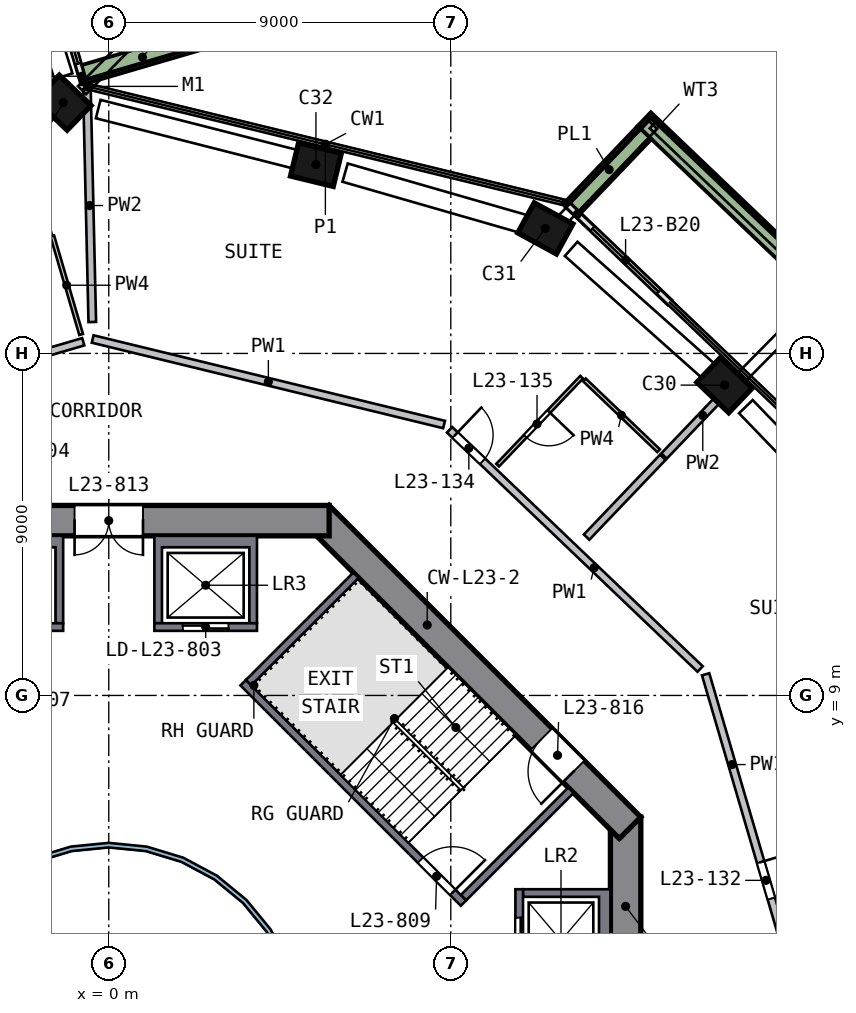
"""IFC4 building model, lengths in metres.
Left out: names, types, materials, properties, quantities, classifications, styles, units other than length and angle.
Written with IfcOpenShell. Run it as: python <this file> out.ifc"""

import sys

from ifc_helpers import new_model, si_unit, direction, frame, frame_2d, origin, origin_2d, place, context, subcontext, project, spatial, polyline, rectangle, outline, extrude, element, fill, save


model = new_model("IFC4")
c1 = context("Model", 3, precision=1e-05, world=origin(), true_north=direction((0.0, 1.0)))
c2 = subcontext(c1, "Body", "Model", "MODEL_VIEW")
j1 = project(units=[si_unit("LENGTHUNIT", "METRE"), si_unit("PLANEANGLEUNIT", "RADIAN")], contexts=[c1])
p1 = place(None, origin())
s1 = spatial("IfcSite", under=j1, at=p1, CompositionType="ELEMENT")
p2 = place(p1, origin())
s2 = spatial("IfcBuilding", under=s1, at=p2, CompositionType="ELEMENT")
p3 = place(p2, frame((0.0, 0.0, 100.0)))
s3 = spatial("IfcBuildingStorey", under=s2, at=p3, CompositionType="ELEMENT", Elevation=100.0)
p4 = place(p3, frame((16.305, 17.074, 0.0), z_axis=(-0.0819059, 0.076886597, 0.993669902), x_axis=(-0.718682033, 0.686204712, -0.112335337)))
e1 = element("IfcColumn", 1, at=p4, inside=s3, PredefinedType="COLUMN", context=c2, shape_type="SweptSolid", body=[
    extrude(rectangle(XDim=1.15, YDim=0.9, at=origin_2d()), origin(), (0.0, 0.0, 1.0), 3.21),
])
p5 = place(p3, frame((11.611, 21.225, 0.0), z_axis=(-0.101418877, 0.054358694, 0.993357611), x_axis=(0.871512169, -0.47668315, 0.115063959)))
e2 = element("IfcColumn", 2, at=p5, inside=s3, PredefinedType="COLUMN", context=c2, shape_type="SweptSolid", body=[
    extrude(rectangle(XDim=1.15, YDim=0.9, at=origin_2d()), origin(), (0.0, 0.0, 1.0), 3.211),
])
p6 = place(p3, frame((5.583, 22.939, 0.0), z_axis=(-0.109285026, 0.025629126, 0.993679994), x_axis=(-0.965473156, 0.235079586, -0.112246039)))
e3 = element("IfcColumn", 3, at=p6, inside=s3, PredefinedType="COLUMN", context=c2, shape_type="SweptSolid", body=[
    extrude(rectangle(XDim=1.15, YDim=0.9, at=origin_2d()), origin(), (0.0, 0.0, 1.0), 3.21),
])
p7 = place(p3, frame((-1.057, 24.606, 0.0), z_axis=(-0.11697585, -0.006004608, 0.993116607), x_axis=(0.716106092, -0.693373762, 0.080155422)))
e4 = element("IfcColumn", 4, at=p7, inside=s3, PredefinedType="COLUMN", context=c2, shape_type="SweptSolid", body=[
    extrude(rectangle(XDim=1.15, YDim=0.9, at=origin_2d()), origin(), (0.0, 0.0, 1.0), 3.212),
])
p8 = place(p3, frame((13.6, -5.799, 0.0), z_axis=(0.0, 0.0, 1.0), x_axis=(0.0, 1.0, 0.0)))
e5 = element("IfcWall", 5, at=p8, inside=s3, PredefinedType="SHEAR", context=c2, shape_type="SweptSolid", body=[
    extrude(rectangle(XDim=11.598, YDim=0.8, at=frame_2d((5.799, 0.0))), origin(), (0.0, 0.0, 1.0), 3.5),
])
p9 = place(p8, frame((4.899, 0.0, 0.0)))
e6 = element("IfcOpeningElement", 6, at=p9, cuts=e5, PredefinedType="OPENING", context=c2, shape_type="SweptSolid", body=[
    extrude(rectangle(XDim=1.8, YDim=2.1, at=frame_2d((0.9, 1.05))), frame((0.0, 0.41, 0.0), z_axis=(0.0, -1.0, 0.0), x_axis=(1.0, 0.0, 0.0)), (0.0, 0.0, 1.0), 0.82),
])
p10 = place(p3, frame((13.717, 5.516, 0.0), z_axis=(0.0, 0.0, 1.0), x_axis=(-0.707106781, 0.707106781, 0.0)))
e7 = element("IfcWall", 7, at=p10, inside=s3, PredefinedType="SHEAR", context=c2, shape_type="SweptSolid", body=[
    extrude(rectangle(XDim=11.598, YDim=0.8, at=frame_2d((5.799, 0.0))), origin(), (0.0, 0.0, 1.0), 3.5),
])
p11 = place(p10, frame((2.099, 0.0, 0.0)))
e8 = element("IfcOpeningElement", 8, at=p11, cuts=e7, PredefinedType="OPENING", context=c2, shape_type="SweptSolid", body=[
    extrude(rectangle(XDim=1.2, YDim=2.1, at=frame_2d((0.6, 1.05))), frame((0.0, 0.41, 0.0), z_axis=(0.0, -1.0, 0.0), x_axis=(1.0, 0.0, 0.0)), (0.0, 0.0, 1.0), 0.82),
])
p12 = place(p3, frame((5.799, 13.6, 0.0), z_axis=(0.0, 0.0, 1.0), x_axis=(-1.0, 0.0, 0.0)))
e9 = element("IfcWall", 9, at=p12, inside=s3, PredefinedType="SHEAR", context=c2, shape_type="SweptSolid", body=[
    extrude(rectangle(XDim=11.598, YDim=0.8, at=frame_2d((5.799, 0.0))), origin(), (0.0, 0.0, 1.0), 3.5),
])
p13 = place(p12, frame((4.899, 0.0, 0.0)))
e10 = element("IfcOpeningElement", 10, at=p13, cuts=e9, PredefinedType="OPENING", context=c2, shape_type="SweptSolid", body=[
    extrude(rectangle(XDim=1.8, YDim=2.1, at=frame_2d((0.9, 1.05))), frame((0.0, 0.41, 0.0), z_axis=(0.0, -1.0, 0.0), x_axis=(1.0, 0.0, 0.0)), (0.0, 0.0, 1.0), 0.82),
])
p14 = place(p3, frame((-0.67, 25.154, 0.0), z_axis=(0.0, 0.0, 1.0), x_axis=(-0.281006451, 0.959705879, 0.0)))
e11 = element("IfcWall", 11, at=p14, inside=s3, PredefinedType="SOLIDWALL", context=c2, shape_type="SweptSolid", body=[
    extrude(rectangle(XDim=2.394, YDim=0.15, at=frame_2d((1.197, 0.0))), origin(), (0.0, 0.0, 1.0), 2.425),
])
p15 = place(p14, frame((0.494, 0.0, 0.0)))
e12 = element("IfcOpeningElement", 12, at=p15, cuts=e11, PredefinedType="OPENING", context=c2, shape_type="SweptSolid", body=[
    extrude(rectangle(XDim=1.5, YDim=2.4, at=frame_2d((0.75, 1.2))), frame((0.0, 0.085, 0.0), z_axis=(0.0, -1.0, 0.0), x_axis=(1.0, 0.0, 0.0)), (0.0, 0.0, 1.0), 0.17),
])
p16 = place(p3, frame((14.757, 19.347, 0.0), z_axis=(0.0, 0.0, 1.0), x_axis=(-0.723237516, 0.690599375, 0.0)))
e13 = element("IfcWall", 13, at=p16, inside=s3, PredefinedType="SOLIDWALL", context=c2, shape_type="SweptSolid", body=[
    extrude(rectangle(XDim=3.71, YDim=0.15, at=frame_2d((1.855, 0.0))), origin(), (0.0, 0.0, 1.0), 2.425),
])
p17 = place(p16, frame((0.4, 0.0, 0.0)))
e14 = element("IfcOpeningElement", 14, at=p17, cuts=e13, PredefinedType="OPENING", context=c2, shape_type="SweptSolid", body=[
    extrude(rectangle(XDim=2.4, YDim=2.4, at=frame_2d((1.2, 1.2))), frame((0.0, 0.085, 0.0), z_axis=(0.0, -1.0, 0.0), x_axis=(1.0, 0.0, 0.0)), (0.0, 0.0, 1.0), 0.17),
])
p18 = place(p3, frame((24.015, 14.688, 0.0), z_axis=(0.0, 0.0, 1.0), x_axis=(-0.723197204, 0.690641589, 0.0)))
e15 = element("IfcWall", 15, at=p18, inside=s3, PredefinedType="SOLIDWALL", context=c2, shape_type="SweptSolid", body=[
    extrude(rectangle(XDim=13.724, YDim=0.5, at=frame_2d((6.862, 0.0))), origin(), (0.0, 0.0, 1.0), 0.7),
])
p19 = place(p3, frame((14.098, 23.813, 0.0), z_axis=(0.0, 0.0, 1.0), x_axis=(-0.690637085, -0.723201505, 0.0)))
e16 = element("IfcWall", 16, at=p19, inside=s3, PredefinedType="SOLIDWALL", context=c2, shape_type="SweptSolid", body=[
    extrude(rectangle(XDim=2.699, YDim=0.5, at=frame_2d((1.35, 0.0))), origin(), (0.0, 0.0, 1.0), 0.7),
])
p20 = place(p3, frame((-0.648, 25.348, 0.0), z_axis=(0.0, 0.0, 1.0), x_axis=(0.959706288, 0.281005054, 0.0)))
e17 = element("IfcWall", 17, at=p20, inside=s3, PredefinedType="SOLIDWALL", context=c2, shape_type="SweptSolid", body=[
    extrude(rectangle(XDim=3.199, YDim=0.5, at=frame_2d((1.6, 0.0))), origin(), (0.0, 0.0, 1.0), 0.7),
])
p21 = place(p3, origin())
e18 = element("IfcWall", 18, at=p21, inside=s3, PredefinedType="SOLIDWALL", context=c2, shape_type="SweptSolid", body=[
    extrude(outline(polyline([(13.2, 3.9), (13.2, 1.2), (10.9, 1.2), (10.9, 1.4), (12.9, 1.4), (12.9, 3.7), (10.9, 3.7), (10.9, 3.9), (13.2, 3.9)])), origin(), (0.0, 0.0, 1.0), 3.19),
])
p22 = place(p3, frame((10.8, 1.2, 0.0), z_axis=(0.0, 0.0, 1.0), x_axis=(0.0, 1.0, 0.0)))
e19 = element("IfcWall", 19, at=p22, inside=s3, PredefinedType="SOLIDWALL", context=c2, shape_type="SweptSolid", body=[
    extrude(rectangle(XDim=2.7, YDim=0.2, at=frame_2d((1.35, 0.0))), origin(), (0.0, 0.0, 1.0), 3.19),
])
p23 = place(p22, frame((0.75, 0.0, 0.0)))
e20 = element("IfcOpeningElement", 20, at=p23, cuts=e19, PredefinedType="OPENING", context=c2, shape_type="SweptSolid", body=[
    extrude(rectangle(XDim=1.2, YDim=2.1, at=frame_2d((0.6, 1.05))), frame((0.0, 0.11, 0.0), z_axis=(0.0, -1.0, 0.0), x_axis=(1.0, 0.0, 0.0)), (0.0, 0.0, 1.0), 0.22),
])
p24 = place(p3, origin())
e21 = element("IfcWall", 21, at=p24, inside=s3, PredefinedType="SOLIDWALL", context=c2, shape_type="SweptSolid", body=[
    extrude(outline(polyline([(3.9, 13.2), (3.9, 10.9), (3.7, 10.9), (3.7, 12.9), (1.4, 12.9), (1.4, 10.9), (1.2, 10.9), (1.2, 13.2), (3.9, 13.2)])), origin(), (0.0, 0.0, 1.0), 3.19),
])
p25 = place(p3, frame((1.2, 10.8, 0.0), z_axis=(0.0, 0.0, 1.0), x_axis=(1.0, 0.0, 0.0)))
e22 = element("IfcWall", 22, at=p25, inside=s3, PredefinedType="SOLIDWALL", context=c2, shape_type="SweptSolid", body=[
    extrude(rectangle(XDim=2.7, YDim=0.2, at=frame_2d((1.35, 0.0))), origin(), (0.0, 0.0, 1.0), 3.19),
])
p26 = place(p25, frame((0.75, 0.0, 0.0)))
e23 = element("IfcOpeningElement", 23, at=p26, cuts=e22, PredefinedType="OPENING", context=c2, shape_type="SweptSolid", body=[
    extrude(rectangle(XDim=1.2, YDim=2.1, at=frame_2d((0.6, 1.05))), frame((0.0, 0.11, 0.0), z_axis=(0.0, -1.0, 0.0), x_axis=(1.0, 0.0, 0.0)), (0.0, 0.0, 1.0), 0.22),
])
p27 = place(p3, origin())
e24 = element("IfcWall", 24, at=p27, inside=s3, PredefinedType="SOLIDWALL", context=c2, shape_type="SweptSolid", body=[
    extrude(outline(polyline([(-3.9, 10.9), (-3.9, 13.2), (-1.2, 13.2), (-1.2, 10.9), (-1.4, 10.9), (-1.4, 12.9), (-3.7, 12.9), (-3.7, 10.9), (-3.9, 10.9)])), origin(), (0.0, 0.0, 1.0), 3.19),
])
p28 = place(p3, frame((-1.2, 10.8, 0.0), z_axis=(0.0, 0.0, 1.0), x_axis=(-1.0, 0.0, 0.0)))
e25 = element("IfcWall", 25, at=p28, inside=s3, PredefinedType="SOLIDWALL", context=c2, shape_type="SweptSolid", body=[
    extrude(rectangle(XDim=2.7, YDim=0.2, at=frame_2d((1.35, 0.0))), origin(), (0.0, 0.0, 1.0), 3.19),
])
p29 = place(p28, frame((0.75, 0.0, 0.0)))
e26 = element("IfcOpeningElement", 26, at=p29, cuts=e25, PredefinedType="OPENING", context=c2, shape_type="SweptSolid", body=[
    extrude(rectangle(XDim=1.2, YDim=2.1, at=frame_2d((0.6, 1.05))), frame((0.0, 0.11, 0.0), z_axis=(0.0, -1.0, 0.0), x_axis=(1.0, 0.0, 0.0)), (0.0, 0.0, 1.0), 0.22),
])
p30 = place(p3, frame((3.535, 9.334, 0.0), z_axis=(0.0, 0.0, 1.0), x_axis=(0.707106781, -0.707106781, 0.0)))
e27 = element("IfcWall", 27, at=p30, inside=s3, PredefinedType="SOLIDWALL", context=c2, shape_type="SweptSolid", body=[
    extrude(rectangle(XDim=8.2, YDim=0.2, at=frame_2d((4.1, 0.0))), origin(), (0.0, 0.0, 1.0), 3.19),
])
p31 = place(p30, frame((6.6, 0.0, 0.0)))
e28 = element("IfcOpeningElement", 28, at=p31, cuts=e27, PredefinedType="OPENING", context=c2, shape_type="SweptSolid", body=[
    extrude(rectangle(XDim=1.2, YDim=2.1, at=frame_2d((0.6, 1.05))), frame((0.0, 0.11, 0.0), z_axis=(0.0, -1.0, 0.0), x_axis=(1.0, 0.0, 0.0)), (0.0, 0.0, 1.0), 0.22),
])
for number, where, z_axis, x_axis in (
    (29, (9.334, 3.677, 0.0), (0.0, 0.0, 1.0), (0.707, 0.707, 0.0)),
    (30, (3.677, 9.334, 0.0), (0.0, 0.0, 1.0), (0.707, 0.707, 0.0)),
):
    element("IfcWall", number, at=place(p3, frame(where, z_axis=z_axis, x_axis=x_axis)), inside=s3, PredefinedType="SOLIDWALL", context=c2, shape_type="SweptSolid", body=[
        extrude(rectangle(XDim=4.0, YDim=0.2, at=frame_2d((2.0, 0.0))), origin(), (0.0, 0.0, 1.0), 3.19),
    ])
p32 = place(p3, origin())
e31 = element("IfcWall", 31, at=p32, inside=s3, PredefinedType="SOLIDWALL", context=c2, shape_type="SweptSolid", body=[
    extrude(outline(polyline([(5.021, -0.999), (4.73, -1.959), (4.257, -2.844), (3.62, -3.62), (2.844, -4.257), (1.959, -4.73), (0.999, -5.021), (0.0, -5.12), (-0.999, -5.021), (-1.959, -4.73), (-2.844, -4.257), (-3.62, -3.62), (-4.257, -2.844), (-4.73, -1.959), (-5.021, -0.999), (-5.12, 0.0), (-5.021, 0.999), (-4.73, 1.959), (-4.257, 2.844), (-3.62, 3.62), (-2.844, 4.257), (-1.959, 4.73), (-0.999, 5.021), (0.0, 5.12), (0.999, 5.021), (1.959, 4.73), (2.844, 4.257), (3.62, 3.62), (4.257, 2.844), (4.73, 1.959), (5.021, 0.999), (5.12, 0.0), (5.021, -0.999)]), holes=[polyline([(4.904, 0.976), (4.619, 1.913), (4.157, 2.778), (3.535, 3.535), (2.778, 4.157), (1.913, 4.619), (0.976, 4.904), (0.0, 5.0), (-0.976, 4.904), (-1.913, 4.619), (-2.778, 4.157), (-3.535, 3.535), (-4.157, 2.778), (-4.619, 1.913), (-4.904, 0.976), (-5.0, 0.0), (-4.904, -0.976), (-4.619, -1.913), (-4.157, -2.778), (-3.535, -3.535), (-2.778, -4.157), (-1.913, -4.619), (-0.976, -4.904), (0.0, -5.0), (0.976, -4.904), (1.913, -4.619), (2.778, -4.157), (3.535, -3.535), (4.157, -2.778), (4.619, -1.913), (4.904, -0.976), (5.0, 0.0), (4.904, 0.976)])]), origin(), (0.0, 0.0, 1.0), 3.19),
])
p33 = place(p3, frame((-0.671, 18.307, 0.0), z_axis=(0.0, 0.0, 1.0), x_axis=(-0.959693013, -0.281050389, 0.0)))
e32 = element("IfcWall", 32, at=p33, inside=s3, PredefinedType="SOLIDWALL", context=c2, shape_type="SweptSolid", body=[
    extrude(rectangle(XDim=3.4, YDim=0.2, at=frame_2d((1.7, 0.0))), origin(), (0.0, 0.0, 1.0), 3.19),
])
p34 = place(p3, frame((8.823, 16.129, 0.0), z_axis=(0.0, 0.0, 1.0), x_axis=(-0.971634313, 0.236488398, 0.0)))
e33 = element("IfcWall", 33, at=p34, inside=s3, PredefinedType="SOLIDWALL", context=c2, shape_type="SweptSolid", body=[
    extrude(rectangle(XDim=9.516, YDim=0.2, at=frame_2d((4.758, 0.0))), origin(), (0.0, 0.0, 1.0), 3.19),
])
p35 = place(p3, frame((8.968, 15.991, 0.0), z_axis=(0.0, 0.0, 1.0), x_axis=(0.723216288, -0.690621605, 0.0)))
e34 = element("IfcWall", 34, at=p35, inside=s3, PredefinedType="SOLIDWALL", context=c2, shape_type="SweptSolid", body=[
    extrude(rectangle(XDim=9.115, YDim=0.2, at=frame_2d((4.558, 0.0))), origin(), (0.0, 0.0, 1.0), 3.19),
])
p36 = place(p35, frame((0.2, 0.0, 0.0)))
e35 = element("IfcOpeningElement", 35, at=p36, cuts=e34, PredefinedType="OPENING", context=c2, shape_type="SweptSolid", body=[
    extrude(rectangle(XDim=1.0, YDim=2.1, at=frame_2d((0.5, 1.05))), frame((0.0, 0.11, 0.0), z_axis=(0.0, -1.0, 0.0), x_axis=(1.0, 0.0, 0.0)), (0.0, 0.0, 1.0), 0.22),
])
p37 = place(p3, frame((15.706, 9.556, 0.0), z_axis=(0.0, 0.0, 1.0), x_axis=(0.281011202, -0.959704488, 0.0)))
e36 = element("IfcWall", 36, at=p37, inside=s3, PredefinedType="SOLIDWALL", context=c2, shape_type="SweptSolid", body=[
    extrude(rectangle(XDim=9.316, YDim=0.2, at=frame_2d((4.658, 0.0))), origin(), (0.0, 0.0, 1.0), 3.19),
])
p38 = place(p37, frame((5.15, 0.0, 0.0)))
e37 = element("IfcOpeningElement", 37, at=p38, cuts=e36, PredefinedType="OPENING", context=c2, shape_type="SweptSolid", body=[
    extrude(rectangle(XDim=1.0, YDim=2.1, at=frame_2d((0.5, 1.05))), frame((0.0, 0.11, 0.0), z_axis=(0.0, -1.0, 0.0), x_axis=(1.0, 0.0, 0.0)), (0.0, 0.0, 1.0), 0.22),
])
p39 = place(p3, frame((-0.575, 24.958, 0.0), z_axis=(0.0, 0.0, 1.0), x_axis=(0.023051497, -0.999734279, 0.0)))
e38 = element("IfcWall", 38, at=p39, inside=s3, PredefinedType="SOLIDWALL", context=c2, shape_type="SweptSolid", body=[
    extrude(rectangle(XDim=6.132, YDim=0.2, at=frame_2d((3.066, 0.0))), origin(), (0.0, 0.0, 1.0), 3.19),
])
p40 = place(p3, frame((12.573, 13.167, 0.0), z_axis=(0.0, 0.0, 1.0), x_axis=(0.690655642, 0.723183783, 0.0)))
e39 = element("IfcWall", 39, at=p40, inside=s3, PredefinedType="SOLIDWALL", context=c2, shape_type="SweptSolid", body=[
    extrude(rectangle(XDim=2.905, YDim=0.2, at=frame_2d((1.452, 0.0))), origin(), (0.0, 0.0, 1.0), 3.19),
])
p41 = place(p3, frame((14.611, 15.3, 0.0), z_axis=(0.0, 0.0, 1.0), x_axis=(0.690627184, 0.72321096, 0.0)))
e40 = element("IfcWall", 40, at=p41, inside=s3, PredefinedType="SOLIDWALL", context=c2, shape_type="SweptSolid", body=[
    extrude(rectangle(XDim=2.952, YDim=0.2, at=frame_2d((1.476, 0.0))), origin(), (0.0, 0.0, 1.0), 3.19),
])
p42 = place(p3, frame((-0.728, 18.499, 0.0), z_axis=(0.0, 0.0, 1.0), x_axis=(-0.28102063, 0.959701727, 0.0)))
e41 = element("IfcWall", 41, at=p42, inside=s3, PredefinedType="PARTITIONING", context=c2, shape_type="SweptSolid", body=[
    extrude(rectangle(XDim=2.7, YDim=0.1, at=frame_2d((1.35, 0.0))), origin(), (0.0, 0.0, 1.0), 3.19),
])
p43 = place(p3, frame((12.443, 17.374, 0.0), z_axis=(0.0, 0.0, 1.0), x_axis=(-0.690669874, -0.723170191, 0.0)))
e42 = element("IfcWall", 42, at=p43, inside=s3, PredefinedType="PARTITIONING", context=c2, shape_type="SweptSolid", body=[
    extrude(rectangle(XDim=3.2, YDim=0.1, at=frame_2d((1.6, 0.0))), origin(), (0.0, 0.0, 1.0), 3.19),
])
p44 = place(p43, frame((1.25, 0.0, 0.0)))
e43 = element("IfcOpeningElement", 43, at=p44, cuts=e42, PredefinedType="OPENING", context=c2, shape_type="SweptSolid", body=[
    extrude(rectangle(XDim=0.9, YDim=2.1, at=frame_2d((0.45, 1.05))), frame((0.0, 0.06, 0.0), z_axis=(0.0, -1.0, 0.0), x_axis=(1.0, 0.0, 0.0)), (0.0, 0.0, 1.0), 0.12),
])
p45 = place(p3, frame((12.515, 17.305, 0.0), z_axis=(0.0, 0.0, 1.0), x_axis=(0.723195404, -0.690643473, 0.0)))
e44 = element("IfcWall", 44, at=p45, inside=s3, PredefinedType="PARTITIONING", context=c2, shape_type="SweptSolid", body=[
    extrude(rectangle(XDim=2.7, YDim=0.1, at=frame_2d((1.35, 0.0))), origin(), (0.0, 0.0, 1.0), 3.19),
])
p46 = place(p15, origin())
e45 = element("IfcDoor", 45, at=p46, inside=s3, OperationType="SLIDING_TO_LEFT", PredefinedType="DOOR", context=c2, shape_type="SweptSolid", body=[
    extrude(rectangle(XDim=1.5, YDim=2.4, at=frame_2d((0.75, 1.2))), frame((0.0, 0.025, 0.0), z_axis=(0.0, -1.0, 0.0), x_axis=(1.0, 0.0, 0.0)), (0.0, 0.0, 1.0), 0.05),
])
fill(e12, e45)
p47 = place(p17, origin())
e46 = element("IfcDoor", 46, at=p47, inside=s3, OperationType="SLIDING_TO_RIGHT", PredefinedType="DOOR", context=c2, shape_type="SweptSolid", body=[
    extrude(rectangle(XDim=2.4, YDim=2.4, at=frame_2d((1.2, 1.2))), frame((0.0, 0.025, 0.0), z_axis=(0.0, -1.0, 0.0), x_axis=(1.0, 0.0, 0.0)), (0.0, 0.0, 1.0), 0.05),
])
fill(e14, e46)
p48 = place(p23, origin())
e47 = element("IfcDoor", 47, at=p48, inside=s3, OperationType="DOUBLE_DOOR_SLIDING", PredefinedType="DOOR", context=c2, shape_type="SweptSolid", body=[
    extrude(rectangle(XDim=1.2, YDim=2.1, at=frame_2d((0.6, 1.05))), frame((0.0, 0.025, 0.0), z_axis=(0.0, -1.0, 0.0), x_axis=(1.0, 0.0, 0.0)), (0.0, 0.0, 1.0), 0.05),
])
fill(e20, e47)
p49 = place(p26, origin())
e48 = element("IfcDoor", 48, at=p49, inside=s3, OperationType="DOUBLE_DOOR_SLIDING", PredefinedType="DOOR", context=c2, shape_type="SweptSolid", body=[
    extrude(rectangle(XDim=1.2, YDim=2.1, at=frame_2d((0.6, 1.05))), frame((0.0, 0.025, 0.0), z_axis=(0.0, -1.0, 0.0), x_axis=(1.0, 0.0, 0.0)), (0.0, 0.0, 1.0), 0.05),
])
fill(e23, e48)
p50 = place(p31, origin())
e49 = element("IfcDoor", 49, at=p50, inside=s3, OperationType="SINGLE_SWING_RIGHT", PredefinedType="DOOR", context=c2, shape_type="SweptSolid", body=[
    extrude(rectangle(XDim=1.2, YDim=2.1, at=frame_2d((0.6, 1.05))), frame((0.0, 0.025, 0.0), z_axis=(0.0, -1.0, 0.0), x_axis=(1.0, 0.0, 0.0)), (0.0, 0.0, 1.0), 0.05),
])
fill(e28, e49)
p51 = place(p13, origin())
e50 = element("IfcDoor", 50, at=p51, inside=s3, OperationType="DOUBLE_DOOR_SINGLE_SWING", PredefinedType="DOOR", context=c2, shape_type="SweptSolid", body=[
    extrude(rectangle(XDim=1.8, YDim=2.1, at=frame_2d((0.9, 1.05))), frame((0.0, 0.025, 0.0), z_axis=(0.0, -1.0, 0.0), x_axis=(1.0, 0.0, 0.0)), (0.0, 0.0, 1.0), 0.05),
])
fill(e10, e50)
p52 = place(p11, origin())
e51 = element("IfcDoor", 51, at=p52, inside=s3, OperationType="SINGLE_SWING_LEFT", PredefinedType="DOOR", context=c2, shape_type="SweptSolid", body=[
    extrude(rectangle(XDim=1.2, YDim=2.1, at=frame_2d((0.6, 1.05))), frame((0.0, 0.025, 0.0), z_axis=(0.0, -1.0, 0.0), x_axis=(1.0, 0.0, 0.0)), (0.0, 0.0, 1.0), 0.05),
])
fill(e8, e51)
p53 = place(p38, origin())
e52 = element("IfcDoor", 52, at=p53, inside=s3, OperationType="SINGLE_SWING_LEFT", PredefinedType="DOOR", context=c2, shape_type="SweptSolid", body=[
    extrude(rectangle(XDim=1.0, YDim=2.1, at=frame_2d((0.5, 1.05))), frame((0.0, 0.025, 0.0), z_axis=(0.0, -1.0, 0.0), x_axis=(1.0, 0.0, 0.0)), (0.0, 0.0, 1.0), 0.05),
])
fill(e37, e52)
p54 = place(p36, origin())
e53 = element("IfcDoor", 53, at=p54, inside=s3, OperationType="SINGLE_SWING_LEFT", PredefinedType="DOOR", context=c2, shape_type="SweptSolid", body=[
    extrude(rectangle(XDim=1.0, YDim=2.1, at=frame_2d((0.5, 1.05))), frame((0.0, 0.025, 0.0), z_axis=(0.0, -1.0, 0.0), x_axis=(1.0, 0.0, 0.0)), (0.0, 0.0, 1.0), 0.05),
])
fill(e35, e53)
p55 = place(p44, origin())
e54 = element("IfcDoor", 54, at=p55, inside=s3, OperationType="SINGLE_SWING_LEFT", PredefinedType="DOOR", context=c2, shape_type="SweptSolid", body=[
    extrude(rectangle(XDim=0.9, YDim=2.1, at=frame_2d((0.45, 1.05))), frame((0.0, 0.025, 0.0), z_axis=(0.0, -1.0, 0.0), x_axis=(1.0, 0.0, 0.0)), (0.0, 0.0, 1.0), 0.05),
])
fill(e43, e54)
save(model, sys.argv[1])
